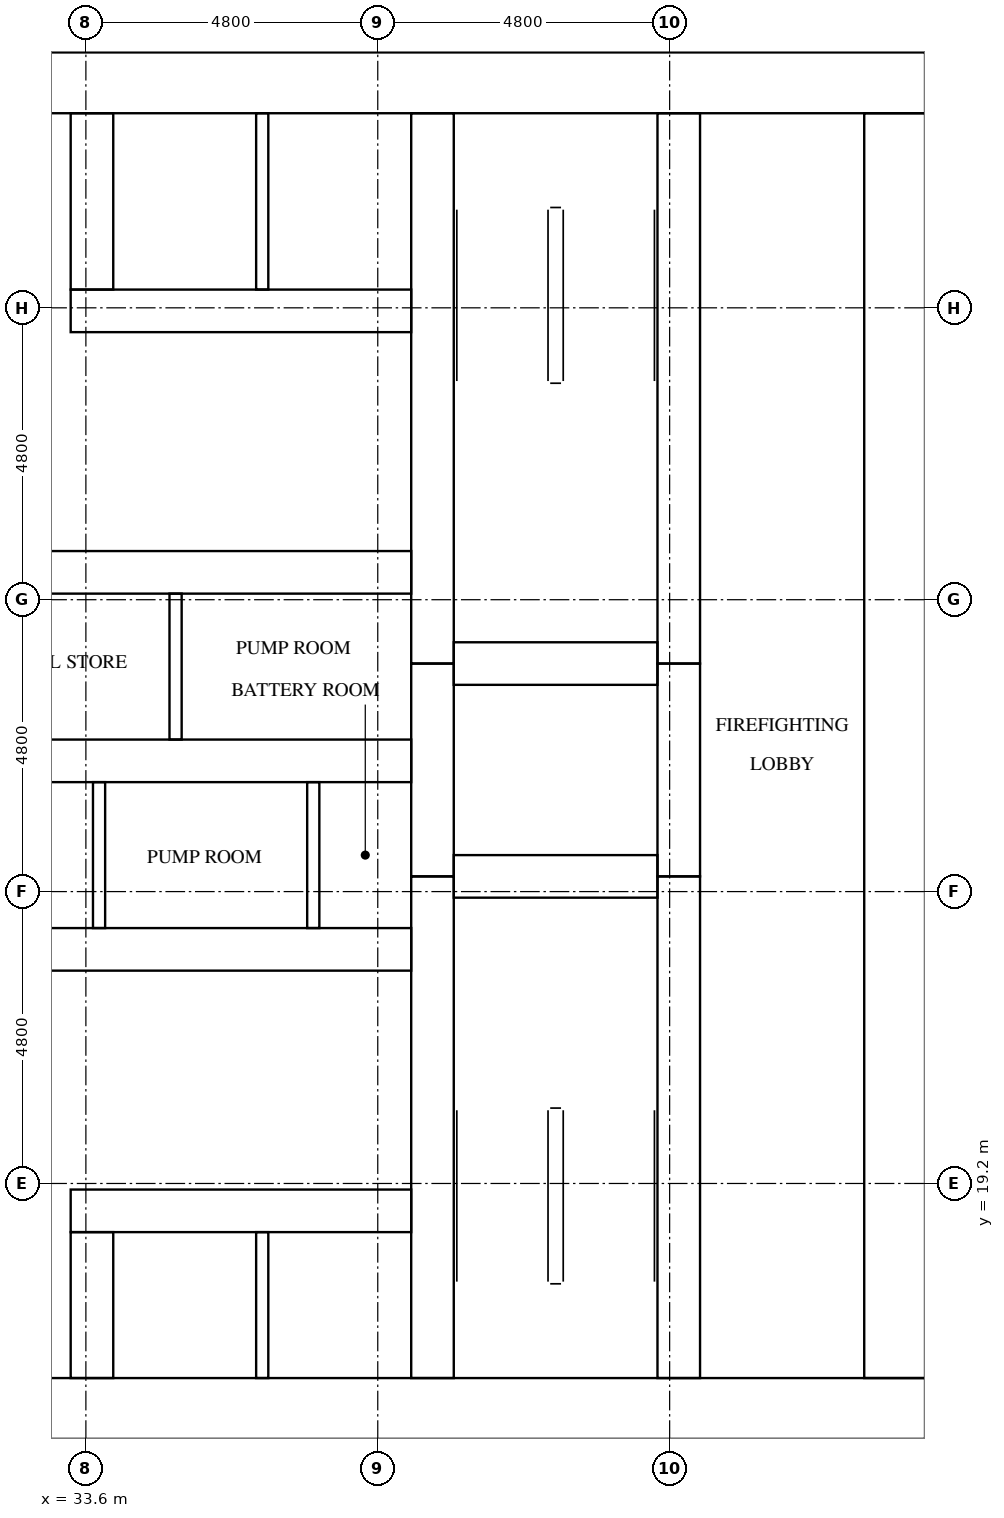
"""IFC4 building model, lengths in metres.
Left out: names, types, materials, properties, quantities, classifications, styles, units other than length and angle.
Written with IfcOpenShell. Run it as: python <this file> out.ifc"""

import sys

from ifc_helpers import new_model, si_unit, direction, frame, frame_2d, origin, place, context, subcontext, project, spatial, rectangle, extrude, element, fill, save


model = new_model("IFC4")
c1 = context("Model", 3, precision=1e-05, world=origin(), true_north=direction((0.0, 1.0)))
c2 = subcontext(c1, "Body", "Model", "MODEL_VIEW")
j1 = project(units=[si_unit("LENGTHUNIT", "METRE"), si_unit("PLANEANGLEUNIT", "RADIAN")], contexts=[c1])
p1 = place(None, origin())
s1 = spatial("IfcSite", under=j1, at=p1, CompositionType="ELEMENT")
p2 = place(p1, origin())
s2 = spatial("IfcBuilding", under=s1, at=p2, CompositionType="ELEMENT")
p3 = place(p2, frame((0.0, 0.0, 46.9)))
s3 = spatial("IfcBuildingStorey", under=s2, at=p3, CompositionType="ELEMENT", Elevation=46.9)
p4 = place(p3, frame((15.0, 15.5, 0.0), z_axis=(0.0, 0.0, 1.0), x_axis=(1.0, 0.0, 0.0)))
e1 = element("IfcWall", 1, at=p4, inside=s3, PredefinedType="SHEAR", context=c2, shape_type="SweptSolid", body=[
    extrude(rectangle(XDim=32.4, YDim=1.0, at=frame_2d((16.2, 0.0))), origin(), (0.0, 0.0, 1.0), 3.2),
])
p5 = place(p4, frame((15.3, 0.0, 0.0)))
e2 = element("IfcOpeningElement", 2, at=p5, cuts=e1, PredefinedType="OPENING", context=c2, shape_type="SweptSolid", body=[
    extrude(rectangle(XDim=1.8, YDim=2.1, at=frame_2d((0.9, 1.05))), frame((0.0, 0.51, 0.0), z_axis=(0.0, -1.0, 0.0), x_axis=(1.0, 0.0, 0.0)), (0.0, 0.0, 1.0), 1.02),
])
p6 = place(p3, frame((15.0, 37.3, 0.0), z_axis=(0.0, 0.0, 1.0), x_axis=(1.0, 0.0, 0.0)))
e3 = element("IfcWall", 3, at=p6, inside=s3, PredefinedType="SHEAR", context=c2, shape_type="SweptSolid", body=[
    extrude(rectangle(XDim=32.4, YDim=1.0, at=frame_2d((16.2, 0.0))), origin(), (0.0, 0.0, 1.0), 3.2),
])
p7 = place(p6, frame((15.3, 0.0, 0.0)))
e4 = element("IfcOpeningElement", 4, at=p7, cuts=e3, PredefinedType="OPENING", context=c2, shape_type="SweptSolid", body=[
    extrude(rectangle(XDim=1.8, YDim=2.1, at=frame_2d((0.9, 1.05))), frame((0.0, 0.51, 0.0), z_axis=(0.0, -1.0, 0.0), x_axis=(1.0, 0.0, 0.0)), (0.0, 0.0, 1.0), 1.02),
])
p8 = place(p6, frame((1.766, 0.0, 0.0)))
e5 = element("IfcOpeningElement", 5, at=p8, cuts=e3, PredefinedType="OPENING", context=c2, shape_type="SweptSolid", body=[
    extrude(rectangle(XDim=1.0, YDim=2.1, at=frame_2d((0.5, 1.05))), frame((0.0, 0.51, 0.0), z_axis=(0.0, -1.0, 0.0), x_axis=(1.0, 0.0, 0.0)), (0.0, 0.0, 1.0), 1.02),
])
p9 = place(p6, frame((5.241, 0.0, 0.0)))
e6 = element("IfcOpeningElement", 6, at=p9, cuts=e3, PredefinedType="OPENING", context=c2, shape_type="SweptSolid", body=[
    extrude(rectangle(XDim=1.0, YDim=2.1, at=frame_2d((0.5, 1.05))), frame((0.0, 0.51, 0.0), z_axis=(0.0, -1.0, 0.0), x_axis=(1.0, 0.0, 0.0)), (0.0, 0.0, 1.0), 1.02),
])
p10 = place(p3, frame((46.9, 16.0, 0.0), z_axis=(0.0, 0.0, 1.0), x_axis=(0.0, 1.0, 0.0)))
e7 = element("IfcWall", 7, at=p10, inside=s3, PredefinedType="SHEAR", context=c2, shape_type="SweptSolid", body=[
    extrude(rectangle(XDim=20.8, YDim=1.0, at=frame_2d((10.4, 0.0))), origin(), (0.0, 0.0, 1.0), 3.2),
])
p11 = place(p10, frame((10.1, 0.0, 0.0)))
e8 = element("IfcOpeningElement", 8, at=p11, cuts=e7, PredefinedType="OPENING", context=c2, shape_type="SweptSolid", body=[
    extrude(rectangle(XDim=1.2, YDim=2.1, at=frame_2d((0.6, 1.05))), frame((0.0, 0.51, 0.0), z_axis=(0.0, -1.0, 0.0), x_axis=(1.0, 0.0, 0.0)), (0.0, 0.0, 1.0), 1.02),
])
p12 = place(p3, frame((39.3, 16.0, 0.0), z_axis=(0.0, 0.0, 1.0), x_axis=(0.0, 1.0, 0.0)))
e9 = element("IfcWall", 9, at=p12, inside=s3, PredefinedType="SHEAR", context=c2, shape_type="SweptSolid", body=[
    extrude(rectangle(XDim=8.25, YDim=0.7, at=frame_2d((4.125, 0.0))), origin(), (0.0, 0.0, 1.0), 3.2),
])
p13 = place(p3, frame((39.3, 24.25, 0.0), z_axis=(0.0, 0.0, 1.0), x_axis=(0.0, 1.0, 0.0)))
e10 = element("IfcWall", 10, at=p13, inside=s3, PredefinedType="SHEAR", context=c2, shape_type="SweptSolid", body=[
    extrude(rectangle(XDim=3.5, YDim=0.7, at=frame_2d((1.75, 0.0))), origin(), (0.0, 0.0, 1.0), 3.2),
])
p14 = place(p3, frame((39.3, 27.75, 0.0), z_axis=(0.0, 0.0, 1.0), x_axis=(0.0, 1.0, 0.0)))
e11 = element("IfcWall", 11, at=p14, inside=s3, PredefinedType="SHEAR", context=c2, shape_type="SweptSolid", body=[
    extrude(rectangle(XDim=9.05, YDim=0.7, at=frame_2d((4.525, 0.0))), origin(), (0.0, 0.0, 1.0), 3.2),
])
p15 = place(p3, frame((43.35, 16.0, 0.0), z_axis=(0.0, 0.0, 1.0), x_axis=(0.0, 1.0, 0.0)))
e12 = element("IfcWall", 12, at=p15, inside=s3, PredefinedType="SHEAR", context=c2, shape_type="SweptSolid", body=[
    extrude(rectangle(XDim=8.25, YDim=0.7, at=frame_2d((4.125, 0.0))), origin(), (0.0, 0.0, 1.0), 3.2),
])
p16 = place(p15, frame((0.2, 0.0, 0.0)))
e13 = element("IfcOpeningElement", 13, at=p16, cuts=e12, PredefinedType="OPENING", context=c2, shape_type="SweptSolid", body=[
    extrude(rectangle(XDim=1.2, YDim=2.1, at=frame_2d((0.6, 1.05))), frame((0.0, 0.36, 0.0), z_axis=(0.0, -1.0, 0.0), x_axis=(1.0, 0.0, 0.0)), (0.0, 0.0, 1.0), 0.72),
])
p17 = place(p3, frame((43.35, 24.25, 0.0), z_axis=(0.0, 0.0, 1.0), x_axis=(0.0, 1.0, 0.0)))
e14 = element("IfcWall", 14, at=p17, inside=s3, PredefinedType="SHEAR", context=c2, shape_type="SweptSolid", body=[
    extrude(rectangle(XDim=3.5, YDim=0.7, at=frame_2d((1.75, 0.0))), origin(), (0.0, 0.0, 1.0), 3.2),
])
p18 = place(p17, frame((1.2, 0.0, 0.0)))
e15 = element("IfcOpeningElement", 15, at=p18, cuts=e14, PredefinedType="OPENING", context=c2, shape_type="SweptSolid", body=[
    extrude(rectangle(XDim=1.1, YDim=2.1, at=frame_2d((0.55, 1.05))), frame((0.0, 0.36, 0.0), z_axis=(0.0, -1.0, 0.0), x_axis=(1.0, 0.0, 0.0)), (0.0, 0.0, 1.0), 0.72),
])
p19 = place(p3, frame((43.35, 27.75, 0.0), z_axis=(0.0, 0.0, 1.0), x_axis=(0.0, 1.0, 0.0)))
e16 = element("IfcWall", 16, at=p19, inside=s3, PredefinedType="SHEAR", context=c2, shape_type="SweptSolid", body=[
    extrude(rectangle(XDim=9.05, YDim=0.7, at=frame_2d((4.525, 0.0))), origin(), (0.0, 0.0, 1.0), 3.2),
])
p20 = place(p19, frame((7.65, 0.0, 0.0)))
e17 = element("IfcOpeningElement", 17, at=p20, cuts=e16, PredefinedType="OPENING", context=c2, shape_type="SweptSolid", body=[
    extrude(rectangle(XDim=1.2, YDim=2.1, at=frame_2d((0.6, 1.05))), frame((0.0, 0.36, 0.0), z_axis=(0.0, -1.0, 0.0), x_axis=(1.0, 0.0, 0.0)), (0.0, 0.0, 1.0), 0.72),
])
for number, where, z_axis, x_axis in (
    (18, (39.65, 24.25, 0.0), (0.0, 0.0, 1.0), (1.0, 0.0, 0.0)),
    (19, (39.65, 27.75, 0.0), (0.0, 0.0, 1.0), (1.0, 0.0, 0.0)),
):
    element("IfcWall", number, at=place(p3, frame(where, z_axis=z_axis, x_axis=x_axis)), inside=s3, PredefinedType="SHEAR", context=c2, shape_type="SweptSolid", body=[
        extrude(rectangle(XDim=3.35, YDim=0.7, at=frame_2d((1.675, 0.0))), origin(), (0.0, 0.0, 1.0), 3.2),
    ])
p21 = place(p3, frame((33.35, 18.75, 0.0), z_axis=(0.0, 0.0, 1.0), x_axis=(1.0, 0.0, 0.0)))
e20 = element("IfcWall", 20, at=p21, inside=s3, PredefinedType="SHEAR", context=c2, shape_type="SweptSolid", body=[
    extrude(rectangle(XDim=5.6, YDim=0.7, at=frame_2d((2.8, 0.0))), origin(), (0.0, 0.0, 1.0), 3.2),
])
p22 = place(p21, frame((1.325, 0.0, 0.0)))
e21 = element("IfcOpeningElement", 21, at=p22, cuts=e20, PredefinedType="OPENING", context=c2, shape_type="SweptSolid", body=[
    extrude(rectangle(XDim=1.1, YDim=2.1, at=frame_2d((0.55, 1.05))), frame((0.0, 0.36, 0.0), z_axis=(0.0, -1.0, 0.0), x_axis=(1.0, 0.0, 0.0)), (0.0, 0.0, 1.0), 0.72),
])
p23 = place(p21, frame((3.875, 0.0, 0.0)))
e22 = element("IfcOpeningElement", 22, at=p23, cuts=e20, PredefinedType="OPENING", context=c2, shape_type="SweptSolid", body=[
    extrude(rectangle(XDim=1.1, YDim=2.1, at=frame_2d((0.55, 1.05))), frame((0.0, 0.36, 0.0), z_axis=(0.0, -1.0, 0.0), x_axis=(1.0, 0.0, 0.0)), (0.0, 0.0, 1.0), 0.72),
])
p24 = place(p3, frame((23.45, 23.05, 0.0), z_axis=(0.0, 0.0, 1.0), x_axis=(1.0, 0.0, 0.0)))
e23 = element("IfcWall", 23, at=p24, inside=s3, PredefinedType="SHEAR", context=c2, shape_type="SweptSolid", body=[
    extrude(rectangle(XDim=15.5, YDim=0.7, at=frame_2d((7.75, 0.0))), origin(), (0.0, 0.0, 1.0), 3.2),
])
p25 = place(p24, frame((0.658, 0.0, 0.0)))
e24 = element("IfcOpeningElement", 24, at=p25, cuts=e23, PredefinedType="OPENING", context=c2, shape_type="SweptSolid", body=[
    extrude(rectangle(XDim=1.1, YDim=2.1, at=frame_2d((0.55, 1.05))), frame((0.0, 0.36, 0.0), z_axis=(0.0, -1.0, 0.0), x_axis=(1.0, 0.0, 0.0)), (0.0, 0.0, 1.0), 0.72),
])
p26 = place(p24, frame((3.275, 0.0, 0.0)))
e25 = element("IfcOpeningElement", 25, at=p26, cuts=e23, PredefinedType="OPENING", context=c2, shape_type="SweptSolid", body=[
    extrude(rectangle(XDim=1.1, YDim=2.1, at=frame_2d((0.55, 1.05))), frame((0.0, 0.36, 0.0), z_axis=(0.0, -1.0, 0.0), x_axis=(1.0, 0.0, 0.0)), (0.0, 0.0, 1.0), 0.72),
])
p27 = place(p24, frame((11.628, 0.0, 0.0)))
e26 = element("IfcOpeningElement", 26, at=p27, cuts=e23, PredefinedType="OPENING", context=c2, shape_type="SweptSolid", body=[
    extrude(rectangle(XDim=1.0, YDim=2.1, at=frame_2d((0.5, 1.05))), frame((0.0, 0.36, 0.0), z_axis=(0.0, -1.0, 0.0), x_axis=(1.0, 0.0, 0.0)), (0.0, 0.0, 1.0), 0.72),
])
p28 = place(p24, frame((14.245, 0.0, 0.0)))
e27 = element("IfcOpeningElement", 27, at=p28, cuts=e23, PredefinedType="OPENING", context=c2, shape_type="SweptSolid", body=[
    extrude(rectangle(XDim=1.0, YDim=2.1, at=frame_2d((0.5, 1.05))), frame((0.0, 0.36, 0.0), z_axis=(0.0, -1.0, 0.0), x_axis=(1.0, 0.0, 0.0)), (0.0, 0.0, 1.0), 0.72),
])
p29 = place(p3, frame((23.45, 26.15, 0.0), z_axis=(0.0, 0.0, 1.0), x_axis=(1.0, 0.0, 0.0)))
e28 = element("IfcWall", 28, at=p29, inside=s3, PredefinedType="SHEAR", context=c2, shape_type="SweptSolid", body=[
    extrude(rectangle(XDim=15.5, YDim=0.7, at=frame_2d((7.75, 0.0))), origin(), (0.0, 0.0, 1.0), 3.2),
])
p30 = place(p3, frame((23.45, 29.25, 0.0), z_axis=(0.0, 0.0, 1.0), x_axis=(1.0, 0.0, 0.0)))
e29 = element("IfcWall", 29, at=p30, inside=s3, PredefinedType="SHEAR", context=c2, shape_type="SweptSolid", body=[
    extrude(rectangle(XDim=15.5, YDim=0.7, at=frame_2d((7.75, 0.0))), origin(), (0.0, 0.0, 1.0), 3.2),
])
p31 = place(p30, frame((1.387, 0.0, 0.0)))
e30 = element("IfcOpeningElement", 30, at=p31, cuts=e29, PredefinedType="OPENING", context=c2, shape_type="SweptSolid", body=[
    extrude(rectangle(XDim=1.0, YDim=2.1, at=frame_2d((0.5, 1.05))), frame((0.0, 0.36, 0.0), z_axis=(0.0, -1.0, 0.0), x_axis=(1.0, 0.0, 0.0)), (0.0, 0.0, 1.0), 0.72),
])
p32 = place(p30, frame((5.312, 0.0, 0.0)))
e31 = element("IfcOpeningElement", 31, at=p32, cuts=e29, PredefinedType="OPENING", context=c2, shape_type="SweptSolid", body=[
    extrude(rectangle(XDim=1.0, YDim=2.1, at=frame_2d((0.5, 1.05))), frame((0.0, 0.36, 0.0), z_axis=(0.0, -1.0, 0.0), x_axis=(1.0, 0.0, 0.0)), (0.0, 0.0, 1.0), 0.72),
])
p33 = place(p30, frame((9.188, 0.0, 0.0)))
e32 = element("IfcOpeningElement", 32, at=p33, cuts=e29, PredefinedType="OPENING", context=c2, shape_type="SweptSolid", body=[
    extrude(rectangle(XDim=1.0, YDim=2.1, at=frame_2d((0.5, 1.05))), frame((0.0, 0.36, 0.0), z_axis=(0.0, -1.0, 0.0), x_axis=(1.0, 0.0, 0.0)), (0.0, 0.0, 1.0), 0.72),
])
p34 = place(p30, frame((13.113, 0.0, 0.0)))
e33 = element("IfcOpeningElement", 33, at=p34, cuts=e29, PredefinedType="OPENING", context=c2, shape_type="SweptSolid", body=[
    extrude(rectangle(XDim=1.0, YDim=2.1, at=frame_2d((0.5, 1.05))), frame((0.0, 0.36, 0.0), z_axis=(0.0, -1.0, 0.0), x_axis=(1.0, 0.0, 0.0)), (0.0, 0.0, 1.0), 0.72),
])
p35 = place(p3, frame((33.35, 33.55, 0.0), z_axis=(0.0, 0.0, 1.0), x_axis=(1.0, 0.0, 0.0)))
e34 = element("IfcWall", 34, at=p35, inside=s3, PredefinedType="SHEAR", context=c2, shape_type="SweptSolid", body=[
    extrude(rectangle(XDim=5.6, YDim=0.7, at=frame_2d((2.8, 0.0))), origin(), (0.0, 0.0, 1.0), 3.2),
])
p36 = place(p3, frame((33.7, 16.0, 0.0), z_axis=(0.0, 0.0, 1.0), x_axis=(0.0, 1.0, 0.0)))
e35 = element("IfcWall", 35, at=p36, inside=s3, PredefinedType="SHEAR", context=c2, shape_type="SweptSolid", body=[
    extrude(rectangle(XDim=2.4, YDim=0.7, at=frame_2d((1.2, 0.0))), origin(), (0.0, 0.0, 1.0), 3.2),
])
p37 = place(p3, frame((33.7, 33.9, 0.0), z_axis=(0.0, 0.0, 1.0), x_axis=(0.0, 1.0, 0.0)))
e36 = element("IfcWall", 36, at=p37, inside=s3, PredefinedType="SHEAR", context=c2, shape_type="SweptSolid", body=[
    extrude(rectangle(XDim=2.9, YDim=0.7, at=frame_2d((1.45, 0.0))), origin(), (0.0, 0.0, 1.0), 3.2),
])
p38 = place(p3, frame((33.817, 23.4, 0.0), z_axis=(0.0, 0.0, 1.0), x_axis=(0.0, 1.0, 0.0)))
e37 = element("IfcWall", 37, at=p38, inside=s3, PredefinedType="SOLIDWALL", context=c2, shape_type="SweptSolid", body=[
    extrude(rectangle(XDim=2.4, YDim=0.2, at=frame_2d((1.2, 0.0))), origin(), (0.0, 0.0, 1.0), 3.2),
])
p39 = place(p3, frame((36.5, 16.0, 0.0), z_axis=(0.0, 0.0, 1.0), x_axis=(0.0, 1.0, 0.0)))
e38 = element("IfcWall", 38, at=p39, inside=s3, PredefinedType="SOLIDWALL", context=c2, shape_type="SweptSolid", body=[
    extrude(rectangle(XDim=2.4, YDim=0.2, at=frame_2d((1.2, 0.0))), origin(), (0.0, 0.0, 1.0), 3.2),
])
p40 = place(p3, frame((36.5, 33.9, 0.0), z_axis=(0.0, 0.0, 1.0), x_axis=(0.0, 1.0, 0.0)))
e39 = element("IfcWall", 39, at=p40, inside=s3, PredefinedType="SOLIDWALL", context=c2, shape_type="SweptSolid", body=[
    extrude(rectangle(XDim=2.9, YDim=0.2, at=frame_2d((1.45, 0.0))), origin(), (0.0, 0.0, 1.0), 3.2),
])
p41 = place(p3, frame((37.339, 23.4, 0.0), z_axis=(0.0, 0.0, 1.0), x_axis=(0.0, 1.0, 0.0)))
e40 = element("IfcWall", 40, at=p41, inside=s3, PredefinedType="PARTITIONING", context=c2, shape_type="SweptSolid", body=[
    extrude(rectangle(XDim=2.4, YDim=0.2, at=frame_2d((1.2, 0.0))), origin(), (0.0, 0.0, 1.0), 3.2),
])
p42 = place(p3, frame((35.075, 26.5, 0.0), z_axis=(0.0, 0.0, 1.0), x_axis=(0.0, 1.0, 0.0)))
e41 = element("IfcWall", 41, at=p42, inside=s3, PredefinedType="PARTITIONING", context=c2, shape_type="SweptSolid", body=[
    extrude(rectangle(XDim=2.4, YDim=0.2, at=frame_2d((1.2, 0.0))), origin(), (0.0, 0.0, 1.0), 3.2),
])
p43 = place(p22, origin())
e42 = element("IfcDoor", 42, at=p43, inside=s3, OperationType="DOUBLE_DOOR_SLIDING", PredefinedType="DOOR", context=c2, shape_type="SweptSolid", body=[
    extrude(rectangle(XDim=1.1, YDim=2.1, at=frame_2d((0.55, 1.05))), frame((0.0, 0.025, 0.0), z_axis=(0.0, -1.0, 0.0), x_axis=(1.0, 0.0, 0.0)), (0.0, 0.0, 1.0), 0.05),
])
fill(e21, e42)
p44 = place(p23, origin())
e43 = element("IfcDoor", 43, at=p44, inside=s3, OperationType="DOUBLE_DOOR_SLIDING", PredefinedType="DOOR", context=c2, shape_type="SweptSolid", body=[
    extrude(rectangle(XDim=1.1, YDim=2.1, at=frame_2d((0.55, 1.05))), frame((0.0, 0.025, 0.0), z_axis=(0.0, -1.0, 0.0), x_axis=(1.0, 0.0, 0.0)), (0.0, 0.0, 1.0), 0.05),
])
fill(e22, e43)
p45 = place(p18, origin())
e44 = element("IfcDoor", 44, at=p45, inside=s3, OperationType="DOUBLE_DOOR_SLIDING", PredefinedType="DOOR", context=c2, shape_type="SweptSolid", body=[
    extrude(rectangle(XDim=1.1, YDim=2.1, at=frame_2d((0.55, 1.05))), frame((0.0, 0.025, 0.0), z_axis=(0.0, -1.0, 0.0), x_axis=(1.0, 0.0, 0.0)), (0.0, 0.0, 1.0), 0.05),
])
fill(e15, e44)
p46 = place(p16, origin())
e45 = element("IfcDoor", 45, at=p46, inside=s3, OperationType="SINGLE_SWING_RIGHT", PredefinedType="DOOR", context=c2, shape_type="SweptSolid", body=[
    extrude(rectangle(XDim=1.2, YDim=2.1, at=frame_2d((0.6, 1.05))), frame((0.0, 0.025, 0.0), z_axis=(0.0, -1.0, 0.0), x_axis=(1.0, 0.0, 0.0)), (0.0, 0.0, 1.0), 0.05),
])
fill(e13, e45)
p47 = place(p20, origin())
e46 = element("IfcDoor", 46, at=p47, inside=s3, OperationType="SINGLE_SWING_LEFT", PredefinedType="DOOR", context=c2, shape_type="SweptSolid", body=[
    extrude(rectangle(XDim=1.2, YDim=2.1, at=frame_2d((0.6, 1.05))), frame((0.0, 0.025, 0.0), z_axis=(0.0, -1.0, 0.0), x_axis=(1.0, 0.0, 0.0)), (0.0, 0.0, 1.0), 0.05),
])
fill(e17, e46)
p48 = place(p11, origin())
e47 = element("IfcDoor", 47, at=p48, inside=s3, OperationType="SINGLE_SWING_LEFT", PredefinedType="DOOR", context=c2, shape_type="SweptSolid", body=[
    extrude(rectangle(XDim=1.2, YDim=2.1, at=frame_2d((0.6, 1.05))), frame((0.0, 0.025, 0.0), z_axis=(0.0, -1.0, 0.0), x_axis=(1.0, 0.0, 0.0)), (0.0, 0.0, 1.0), 0.05),
])
fill(e8, e47)
p49 = place(p27, frame((1.0, 0.0, 0.0), z_axis=(0.0, 0.0, 1.0), x_axis=(-1.0, 0.0, 0.0)))
e48 = element("IfcDoor", 48, at=p49, inside=s3, OperationType="SINGLE_SWING_RIGHT", PredefinedType="DOOR", context=c2, shape_type="SweptSolid", body=[
    extrude(rectangle(XDim=1.0, YDim=2.1, at=frame_2d((0.5, 1.05))), frame((0.0, 0.025, 0.0), z_axis=(0.0, -1.0, 0.0), x_axis=(1.0, 0.0, 0.0)), (0.0, 0.0, 1.0), 0.05),
])
fill(e26, e48)
p50 = place(p28, frame((1.0, 0.0, 0.0), z_axis=(0.0, 0.0, 1.0), x_axis=(-1.0, 0.0, 0.0)))
e49 = element("IfcDoor", 49, at=p50, inside=s3, OperationType="SINGLE_SWING_LEFT", PredefinedType="DOOR", context=c2, shape_type="SweptSolid", body=[
    extrude(rectangle(XDim=1.0, YDim=2.1, at=frame_2d((0.5, 1.05))), frame((0.0, 0.025, 0.0), z_axis=(0.0, -1.0, 0.0), x_axis=(1.0, 0.0, 0.0)), (0.0, 0.0, 1.0), 0.05),
])
fill(e27, e49)
p51 = place(p33, origin())
e50 = element("IfcDoor", 50, at=p51, inside=s3, OperationType="SINGLE_SWING_RIGHT", PredefinedType="DOOR", context=c2, shape_type="SweptSolid", body=[
    extrude(rectangle(XDim=1.0, YDim=2.1, at=frame_2d((0.5, 1.05))), frame((0.0, 0.025, 0.0), z_axis=(0.0, -1.0, 0.0), x_axis=(1.0, 0.0, 0.0)), (0.0, 0.0, 1.0), 0.05),
])
fill(e32, e50)
p52 = place(p34, origin())
e51 = element("IfcDoor", 51, at=p52, inside=s3, OperationType="SINGLE_SWING_LEFT", PredefinedType="DOOR", context=c2, shape_type="SweptSolid", body=[
    extrude(rectangle(XDim=1.0, YDim=2.1, at=frame_2d((0.5, 1.05))), frame((0.0, 0.025, 0.0), z_axis=(0.0, -1.0, 0.0), x_axis=(1.0, 0.0, 0.0)), (0.0, 0.0, 1.0), 0.05),
])
fill(e33, e51)
save(model, sys.argv[1])
